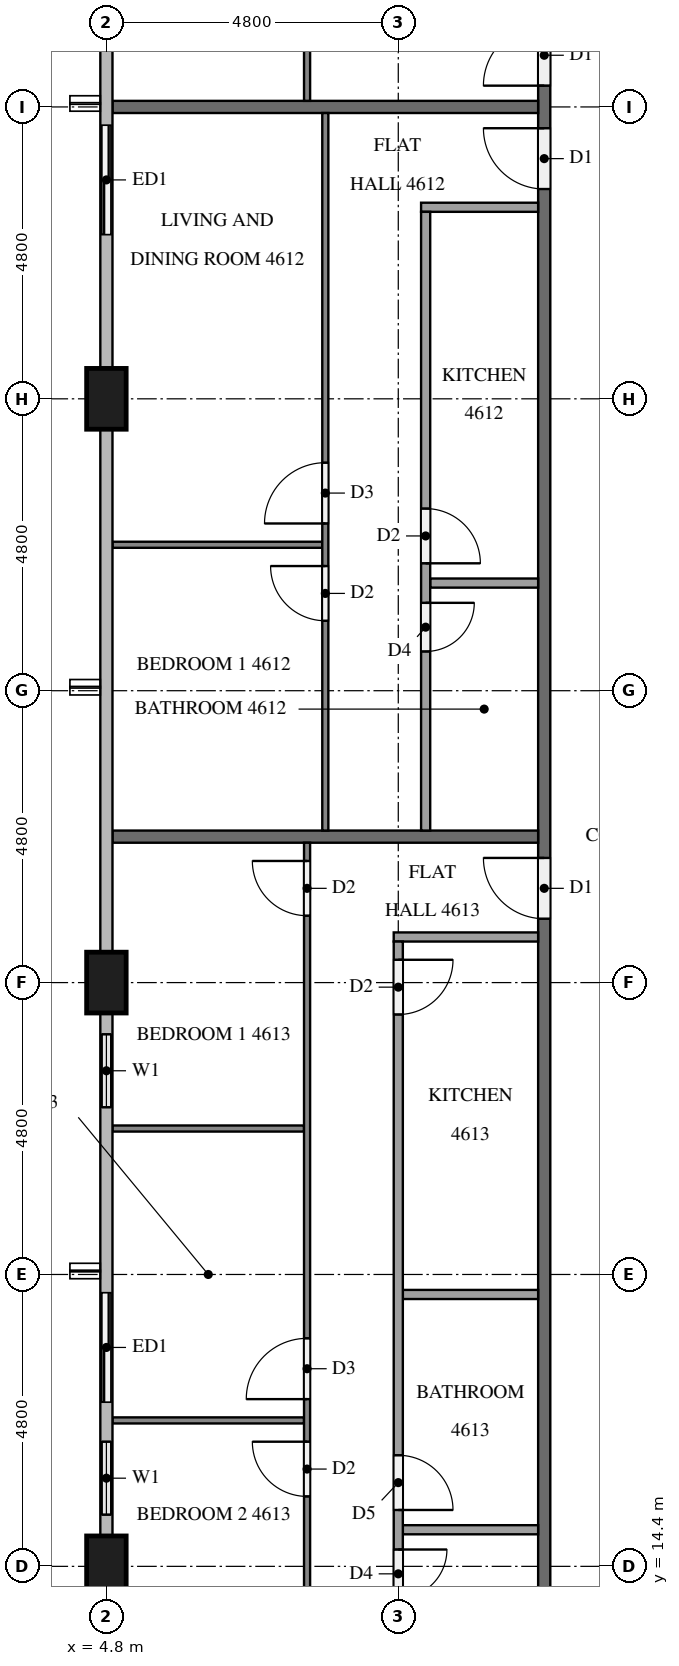
"""IFC4 building model, lengths in metres.
Left out: names, types, materials, properties, quantities, classifications, styles, units other than length and angle.
Written with IfcOpenShell. Run it as: python <this file> out.ifc"""

import sys

from ifc_helpers import new_model, si_unit, direction, frame, frame_2d, origin, origin_2d, place, context, subcontext, project, spatial, rectangle, extrude, element, fill, save


model = new_model("IFC4")
c1 = context("Model", 3, precision=1e-05, world=origin(), true_north=direction((0.0, 1.0)))
c2 = subcontext(c1, "Body", "Model", "MODEL_VIEW")
j1 = project(units=[si_unit("LENGTHUNIT", "METRE"), si_unit("PLANEANGLEUNIT", "RADIAN")], contexts=[c1])
p1 = place(None, origin())
s1 = spatial("IfcSite", under=j1, at=p1, CompositionType="ELEMENT")
p2 = place(p1, origin())
s2 = spatial("IfcBuilding", under=s1, at=p2, CompositionType="ELEMENT")
p3 = place(p2, frame((0.0, 0.0, 178.9)))
s3 = spatial("IfcBuildingStorey", under=s2, at=p3, CompositionType="ELEMENT", Elevation=178.9)
for number, where, z_axis, x_axis in (
    (1, (4.8, 33.6, 0.0), (0.0, 0.0, 1.0), (0.0, 1.0, 0.0)),
    (2, (4.8, 24.0, 0.0), (0.0, 0.0, 1.0), (0.0, 1.0, 0.0)),
    (3, (4.8, 14.4, 0.0), (0.0, 0.0, 1.0), (0.0, 1.0, 0.0)),
):
    element("IfcColumn", number, at=place(p3, frame(where, z_axis=z_axis, x_axis=x_axis)), inside=s3, PredefinedType="COLUMN", context=c2, shape_type="SweptSolid", body=[
        extrude(rectangle(XDim=1.0, YDim=0.65, at=origin_2d()), origin(), (0.0, 0.0, 1.0), 3.2),
    ])
p4 = place(p3, frame((4.8, 38.4, 0.0), z_axis=(0.0, 0.0, 1.0), x_axis=(0.0, -1.0, 0.0)))
e4 = element("IfcWall", 4, at=p4, inside=s3, PredefinedType="SOLIDWALL", context=c2, shape_type="SweptSolid", body=[
    extrude(rectangle(XDim=2.4, YDim=0.15, at=frame_2d((1.2, 0.0))), origin(), (0.0, 0.0, 1.0), 3.2),
])
p5 = place(p4, frame((0.3, 0.0, 0.0)))
e5 = element("IfcOpeningElement", 5, at=p5, cuts=e4, PredefinedType="OPENING", context=c2, shape_type="SweptSolid", body=[
    extrude(rectangle(XDim=1.8, YDim=2.4, at=frame_2d((0.9, 1.2))), frame((0.0, 0.085, 0.0), z_axis=(0.0, -1.0, 0.0), x_axis=(1.0, 0.0, 0.0)), (0.0, 0.0, 1.0), 0.17),
])
p6 = place(p3, frame((4.8, 23.5, 0.0), z_axis=(0.0, 0.0, 1.0), x_axis=(0.0, -1.0, 0.0)))
e6 = element("IfcWall", 6, at=p6, inside=s3, PredefinedType="SOLIDWALL", context=c2, shape_type="SweptSolid", body=[
    extrude(rectangle(XDim=1.9, YDim=0.15, at=frame_2d((0.95, 0.0))), origin(), (0.0, 0.0, 1.0), 3.2),
])
p7 = place(p6, frame((0.35, 0.0, 0.9)))
e7 = element("IfcOpeningElement", 7, at=p7, cuts=e6, PredefinedType="OPENING", context=c2, shape_type="SweptSolid", body=[
    extrude(rectangle(XDim=1.2, YDim=1.4, at=frame_2d((0.6, 0.7))), frame((0.0, 0.085, 0.0), z_axis=(0.0, -1.0, 0.0), x_axis=(1.0, 0.0, 0.0)), (0.0, 0.0, 1.0), 0.17),
])
p8 = place(p3, frame((4.8, 19.2, 0.0), z_axis=(0.0, 0.0, 1.0), x_axis=(0.0, -1.0, 0.0)))
e8 = element("IfcWall", 8, at=p8, inside=s3, PredefinedType="SOLIDWALL", context=c2, shape_type="SweptSolid", body=[
    extrude(rectangle(XDim=4.3, YDim=0.15, at=frame_2d((2.15, 0.0))), origin(), (0.0, 0.0, 1.0), 3.2),
])
p9 = place(p8, frame((0.3, 0.0, 0.0)))
e9 = element("IfcOpeningElement", 9, at=p9, cuts=e8, PredefinedType="OPENING", context=c2, shape_type="SweptSolid", body=[
    extrude(rectangle(XDim=1.8, YDim=2.4, at=frame_2d((0.9, 1.2))), frame((0.0, 0.085, 0.0), z_axis=(0.0, -1.0, 0.0), x_axis=(1.0, 0.0, 0.0)), (0.0, 0.0, 1.0), 0.17),
])
p10 = place(p8, frame((2.75, 0.0, 0.9)))
e10 = element("IfcOpeningElement", 10, at=p10, cuts=e8, PredefinedType="OPENING", context=c2, shape_type="SweptSolid", body=[
    extrude(rectangle(XDim=1.2, YDim=1.4, at=frame_2d((0.6, 0.7))), frame((0.0, 0.085, 0.0), z_axis=(0.0, -1.0, 0.0), x_axis=(1.0, 0.0, 0.0)), (0.0, 0.0, 1.0), 0.17),
])
p11 = place(p3, frame((12.0, 12.1, 0.0), z_axis=(0.0, 0.0, 1.0), x_axis=(0.0, 1.0, 0.0)))
e11 = element("IfcWall", 11, at=p11, inside=s3, PredefinedType="PARTITIONING", context=c2, shape_type="SweptSolid", body=[
    extrude(rectangle(XDim=28.6, YDim=0.2, at=frame_2d((14.3, 0.0))), origin(), (0.0, 0.0, 1.0), 3.2),
])
p12 = place(p11, frame((26.65, 0.0, 0.0)))
e12 = element("IfcOpeningElement", 12, at=p12, cuts=e11, PredefinedType="OPENING", context=c2, shape_type="SweptSolid", body=[
    extrude(rectangle(XDim=1.0, YDim=2.1, at=frame_2d((0.5, 1.05))), frame((0.0, 0.11, 0.0), z_axis=(0.0, -1.0, 0.0), x_axis=(1.0, 0.0, 0.0)), (0.0, 0.0, 1.0), 0.22),
])
p13 = place(p11, frame((24.95, 0.0, 0.0)))
e13 = element("IfcOpeningElement", 13, at=p13, cuts=e11, PredefinedType="OPENING", context=c2, shape_type="SweptSolid", body=[
    extrude(rectangle(XDim=1.0, YDim=2.1, at=frame_2d((0.5, 1.05))), frame((0.0, 0.11, 0.0), z_axis=(0.0, -1.0, 0.0), x_axis=(1.0, 0.0, 0.0)), (0.0, 0.0, 1.0), 0.22),
])
p14 = place(p11, frame((12.95, 0.0, 0.0)))
e14 = element("IfcOpeningElement", 14, at=p14, cuts=e11, PredefinedType="OPENING", context=c2, shape_type="SweptSolid", body=[
    extrude(rectangle(XDim=1.0, YDim=2.1, at=frame_2d((0.5, 1.05))), frame((0.0, 0.11, 0.0), z_axis=(0.0, -1.0, 0.0), x_axis=(1.0, 0.0, 0.0)), (0.0, 0.0, 1.0), 0.22),
])
for number, where, z_axis, x_axis in (
    (15, (4.9, 38.4, 0.0), (0.0, 0.0, 1.0), (1.0, 0.0, 0.0)),
    (16, (4.9, 26.4, 0.0), (0.0, 0.0, 1.0), (1.0, 0.0, 0.0)),
):
    element("IfcWall", number, at=place(p3, frame(where, z_axis=z_axis, x_axis=x_axis)), inside=s3, PredefinedType="PARTITIONING", context=c2, shape_type="SweptSolid", body=[
        extrude(rectangle(XDim=7.0, YDim=0.2, at=frame_2d((3.5, 0.0))), origin(), (0.0, 0.0, 1.0), 3.2),
    ])
p15 = place(p3, frame((8.1, 38.5, 0.0), z_axis=(0.0, 0.0, 1.0), x_axis=(0.0, 1.0, 0.0)))
e17 = element("IfcWall", 17, at=p15, inside=s3, PredefinedType="PARTITIONING", context=c2, shape_type="SweptSolid", body=[
    extrude(rectangle(XDim=8.998, YDim=0.1, at=frame_2d((4.499, 0.0))), origin(), (0.0, 0.0, 1.0), 3.2),
])
p16 = place(p15, frame((3.35, 0.0, 0.0)))
e18 = element("IfcOpeningElement", 18, at=p16, cuts=e17, PredefinedType="OPENING", context=c2, shape_type="SweptSolid", body=[
    extrude(rectangle(XDim=1.0, YDim=2.1, at=frame_2d((0.5, 1.05))), frame((0.0, 0.06, 0.0), z_axis=(0.0, -1.0, 0.0), x_axis=(1.0, 0.0, 0.0)), (0.0, 0.0, 1.0), 0.12),
])
p17 = place(p15, frame((5.05, 0.0, 0.0)))
e19 = element("IfcOpeningElement", 19, at=p17, cuts=e17, PredefinedType="OPENING", context=c2, shape_type="SweptSolid", body=[
    extrude(rectangle(XDim=0.9, YDim=2.1, at=frame_2d((0.45, 1.05))), frame((0.0, 0.06, 0.0), z_axis=(0.0, -1.0, 0.0), x_axis=(1.0, 0.0, 0.0)), (0.0, 0.0, 1.0), 0.12),
])
p18 = place(p3, frame((8.35, 31.2, 0.0), z_axis=(0.0, 0.0, 1.0), x_axis=(-1.0, 0.0, 0.0)))
e20 = element("IfcWall", 20, at=p18, inside=s3, PredefinedType="PARTITIONING", context=c2, shape_type="SweptSolid", body=[
    extrude(rectangle(XDim=3.45, YDim=0.1, at=frame_2d((1.725, 0.0))), origin(), (0.0, 0.0, 1.0), 3.2),
])
p19 = place(p3, frame((8.4, 26.5, 0.0), z_axis=(0.0, 0.0, 1.0), x_axis=(0.0, 1.0, 0.0)))
e21 = element("IfcWall", 21, at=p19, inside=s3, PredefinedType="PARTITIONING", context=c2, shape_type="SweptSolid", body=[
    extrude(rectangle(XDim=11.8, YDim=0.1, at=frame_2d((5.9, 0.0))), origin(), (0.0, 0.0, 1.0), 3.2),
])
p20 = place(p19, frame((5.05, 0.0, 0.0)))
e22 = element("IfcOpeningElement", 22, at=p20, cuts=e21, PredefinedType="OPENING", context=c2, shape_type="SweptSolid", body=[
    extrude(rectangle(XDim=1.0, YDim=2.1, at=frame_2d((0.5, 1.05))), frame((0.0, 0.06, 0.0), z_axis=(0.0, -1.0, 0.0), x_axis=(1.0, 0.0, 0.0)), (0.0, 0.0, 1.0), 0.12),
])
p21 = place(p19, frame((3.45, 0.0, 0.0)))
e23 = element("IfcOpeningElement", 23, at=p21, cuts=e21, PredefinedType="OPENING", context=c2, shape_type="SweptSolid", body=[
    extrude(rectangle(XDim=0.9, YDim=2.1, at=frame_2d((0.45, 1.05))), frame((0.0, 0.06, 0.0), z_axis=(0.0, -1.0, 0.0), x_axis=(1.0, 0.0, 0.0)), (0.0, 0.0, 1.0), 0.12),
])
p22 = place(p3, frame((11.9, 30.57, 0.0), z_axis=(0.0, 0.0, 1.0), x_axis=(-1.0, 0.0, 0.0)))
e24 = element("IfcWall", 24, at=p22, inside=s3, PredefinedType="PARTITIONING", context=c2, shape_type="SweptSolid", body=[
    extrude(rectangle(XDim=1.775, YDim=0.15, at=frame_2d((0.887, 0.0))), origin(), (0.0, 0.0, 1.0), 3.2),
])
p23 = place(p3, frame((11.9, 36.75, 0.0), z_axis=(0.0, 0.0, 1.0), x_axis=(-1.0, 0.0, 0.0)))
e25 = element("IfcWall", 25, at=p23, inside=s3, PredefinedType="PARTITIONING", context=c2, shape_type="SweptSolid", body=[
    extrude(rectangle(XDim=1.925, YDim=0.15, at=frame_2d((0.962, 0.0))), origin(), (0.0, 0.0, 1.0), 3.2),
])
p24 = place(p3, frame((10.05, 36.675, 0.0), z_axis=(0.0, 0.0, 1.0), x_axis=(0.0, -1.0, 0.0)))
e26 = element("IfcWall", 26, at=p24, inside=s3, PredefinedType="PARTITIONING", context=c2, shape_type="SweptSolid", body=[
    extrude(rectangle(XDim=10.175, YDim=0.15, at=frame_2d((5.087, 0.0))), origin(), (0.0, 0.0, 1.0), 3.2),
])
p25 = place(p24, frame((4.88, 0.0, 0.0)))
e27 = element("IfcOpeningElement", 27, at=p25, cuts=e26, PredefinedType="OPENING", context=c2, shape_type="SweptSolid", body=[
    extrude(rectangle(XDim=0.9, YDim=2.1, at=frame_2d((0.45, 1.05))), frame((0.0, 0.085, 0.0), z_axis=(0.0, -1.0, 0.0), x_axis=(1.0, 0.0, 0.0)), (0.0, 0.0, 1.0), 0.17),
])
p26 = place(p24, frame((6.43, 0.0, 0.0)))
e28 = element("IfcOpeningElement", 28, at=p26, cuts=e26, PredefinedType="OPENING", context=c2, shape_type="SweptSolid", body=[
    extrude(rectangle(XDim=0.8, YDim=2.1, at=frame_2d((0.4, 1.05))), frame((0.0, 0.085, 0.0), z_axis=(0.0, -1.0, 0.0), x_axis=(1.0, 0.0, 0.0)), (0.0, 0.0, 1.0), 0.17),
])
for number, where, z_axis, x_axis in (
    (29, (8.05, 21.6, 0.0), (0.0, 0.0, 1.0), (-1.0, 0.0, 0.0)),
    (30, (8.05, 16.8, 0.0), (0.0, 0.0, 1.0), (-1.0, 0.0, 0.0)),
):
    element("IfcWall", number, at=place(p3, frame(where, z_axis=z_axis, x_axis=x_axis)), inside=s3, PredefinedType="PARTITIONING", context=c2, shape_type="SweptSolid", body=[
        extrude(rectangle(XDim=3.15, YDim=0.1, at=frame_2d((1.575, 0.0))), origin(), (0.0, 0.0, 1.0), 3.2),
    ])
p27 = place(p3, frame((8.1, 12.1, 0.0), z_axis=(0.0, 0.0, 1.0), x_axis=(0.0, 1.0, 0.0)))
e31 = element("IfcWall", 31, at=p27, inside=s3, PredefinedType="PARTITIONING", context=c2, shape_type="SweptSolid", body=[
    extrude(rectangle(XDim=14.2, YDim=0.1, at=frame_2d((7.1, 0.0))), origin(), (0.0, 0.0, 1.0), 3.2),
])
p28 = place(p27, frame((13.0, 0.0, 0.0)))
e32 = element("IfcOpeningElement", 32, at=p28, cuts=e31, PredefinedType="OPENING", context=c2, shape_type="SweptSolid", body=[
    extrude(rectangle(XDim=0.9, YDim=2.1, at=frame_2d((0.45, 1.05))), frame((0.0, 0.06, 0.0), z_axis=(0.0, -1.0, 0.0), x_axis=(1.0, 0.0, 0.0)), (0.0, 0.0, 1.0), 0.12),
])
p29 = place(p27, frame((5.05, 0.0, 0.0)))
e33 = element("IfcOpeningElement", 33, at=p29, cuts=e31, PredefinedType="OPENING", context=c2, shape_type="SweptSolid", body=[
    extrude(rectangle(XDim=1.0, YDim=2.1, at=frame_2d((0.5, 1.05))), frame((0.0, 0.06, 0.0), z_axis=(0.0, -1.0, 0.0), x_axis=(1.0, 0.0, 0.0)), (0.0, 0.0, 1.0), 0.12),
])
p30 = place(p27, frame((3.45, 0.0, 0.0)))
e34 = element("IfcOpeningElement", 34, at=p30, cuts=e31, PredefinedType="OPENING", context=c2, shape_type="SweptSolid", body=[
    extrude(rectangle(XDim=0.9, YDim=2.1, at=frame_2d((0.45, 1.05))), frame((0.0, 0.06, 0.0), z_axis=(0.0, -1.0, 0.0), x_axis=(1.0, 0.0, 0.0)), (0.0, 0.0, 1.0), 0.12),
])
for number, where, z_axis, x_axis in (
    (35, (11.9, 18.871, 0.0), (0.0, 0.0, 1.0), (-1.0, 0.0, 0.0)),
    (36, (11.9, 15.002, 0.0), (0.0, 0.0, 1.0), (-1.0, 0.0, 0.0)),
):
    element("IfcWall", number, at=place(p3, frame(where, z_axis=z_axis, x_axis=x_axis)), inside=s3, PredefinedType="PARTITIONING", context=c2, shape_type="SweptSolid", body=[
        extrude(rectangle(XDim=2.225, YDim=0.15, at=frame_2d((1.112, 0.0))), origin(), (0.0, 0.0, 1.0), 3.2),
    ])
p31 = place(p3, frame((11.9, 24.75, 0.0), z_axis=(0.0, 0.0, 1.0), x_axis=(-1.0, 0.0, 0.0)))
e37 = element("IfcWall", 37, at=p31, inside=s3, PredefinedType="PARTITIONING", context=c2, shape_type="SweptSolid", body=[
    extrude(rectangle(XDim=2.375, YDim=0.15, at=frame_2d((1.188, 0.0))), origin(), (0.0, 0.0, 1.0), 3.2),
])
p32 = place(p3, frame((9.6, 24.675, 0.0), z_axis=(0.0, 0.0, 1.0), x_axis=(0.0, -1.0, 0.0)))
e38 = element("IfcWall", 38, at=p32, inside=s3, PredefinedType="PARTITIONING", context=c2, shape_type="SweptSolid", body=[
    extrude(rectangle(XDim=12.575, YDim=0.15, at=frame_2d((6.288, 0.0))), origin(), (0.0, 0.0, 1.0), 3.2),
])
p33 = place(p32, frame((0.3, 0.0, 0.0)))
e39 = element("IfcOpeningElement", 39, at=p33, cuts=e38, PredefinedType="OPENING", context=c2, shape_type="SweptSolid", body=[
    extrude(rectangle(XDim=0.9, YDim=2.1, at=frame_2d((0.45, 1.05))), frame((0.0, 0.085, 0.0), z_axis=(0.0, -1.0, 0.0), x_axis=(1.0, 0.0, 0.0)), (0.0, 0.0, 1.0), 0.17),
])
p34 = place(p32, frame((8.448, 0.0, 0.0)))
e40 = element("IfcOpeningElement", 40, at=p34, cuts=e38, PredefinedType="OPENING", context=c2, shape_type="SweptSolid", body=[
    extrude(rectangle(XDim=0.9, YDim=2.1, at=frame_2d((0.45, 1.05))), frame((0.0, 0.085, 0.0), z_axis=(0.0, -1.0, 0.0), x_axis=(1.0, 0.0, 0.0)), (0.0, 0.0, 1.0), 0.17),
])
p35 = place(p32, frame((9.998, 0.0, 0.0)))
e41 = element("IfcOpeningElement", 41, at=p35, cuts=e38, PredefinedType="OPENING", context=c2, shape_type="SweptSolid", body=[
    extrude(rectangle(XDim=0.8, YDim=2.1, at=frame_2d((0.4, 1.05))), frame((0.0, 0.085, 0.0), z_axis=(0.0, -1.0, 0.0), x_axis=(1.0, 0.0, 0.0)), (0.0, 0.0, 1.0), 0.17),
])
p36 = place(p5, origin())
e42 = element("IfcDoor", 42, at=p36, inside=s3, OperationType="SLIDING_TO_RIGHT", PredefinedType="DOOR", context=c2, shape_type="SweptSolid", body=[
    extrude(rectangle(XDim=1.8, YDim=2.4, at=frame_2d((0.9, 1.2))), frame((0.0, 0.025, 0.0), z_axis=(0.0, -1.0, 0.0), x_axis=(1.0, 0.0, 0.0)), (0.0, 0.0, 1.0), 0.05),
])
fill(e5, e42)
p37 = place(p7, origin())
e43 = element("IfcWindow", 43, at=p37, inside=s3, PartitioningType="SINGLE_PANEL", PredefinedType="WINDOW", context=c2, shape_type="SweptSolid", body=[
    extrude(rectangle(XDim=1.2, YDim=1.4, at=frame_2d((0.6, 0.7))), frame((0.0, 0.03, 0.0), z_axis=(0.0, -1.0, 0.0), x_axis=(1.0, 0.0, 0.0)), (0.0, 0.0, 1.0), 0.06),
])
fill(e7, e43)
p38 = place(p9, origin())
e44 = element("IfcDoor", 44, at=p38, inside=s3, OperationType="SLIDING_TO_LEFT", PredefinedType="DOOR", context=c2, shape_type="SweptSolid", body=[
    extrude(rectangle(XDim=1.8, YDim=2.4, at=frame_2d((0.9, 1.2))), frame((0.0, 0.025, 0.0), z_axis=(0.0, -1.0, 0.0), x_axis=(1.0, 0.0, 0.0)), (0.0, 0.0, 1.0), 0.05),
])
fill(e9, e44)
p39 = place(p10, origin())
e45 = element("IfcWindow", 45, at=p39, inside=s3, PartitioningType="SINGLE_PANEL", PredefinedType="WINDOW", context=c2, shape_type="SweptSolid", body=[
    extrude(rectangle(XDim=1.2, YDim=1.4, at=frame_2d((0.6, 0.7))), frame((0.0, 0.03, 0.0), z_axis=(0.0, -1.0, 0.0), x_axis=(1.0, 0.0, 0.0)), (0.0, 0.0, 1.0), 0.06),
])
fill(e10, e45)
p40 = place(p12, origin())
e46 = element("IfcDoor", 46, at=p40, inside=s3, OperationType="SINGLE_SWING_LEFT", PredefinedType="DOOR", context=c2, shape_type="SweptSolid", body=[
    extrude(rectangle(XDim=1.0, YDim=2.1, at=frame_2d((0.5, 1.05))), frame((0.0, 0.025, 0.0), z_axis=(0.0, -1.0, 0.0), x_axis=(1.0, 0.0, 0.0)), (0.0, 0.0, 1.0), 0.05),
])
fill(e12, e46)
p41 = place(p13, origin())
e47 = element("IfcDoor", 47, at=p41, inside=s3, OperationType="SINGLE_SWING_RIGHT", PredefinedType="DOOR", context=c2, shape_type="SweptSolid", body=[
    extrude(rectangle(XDim=1.0, YDim=2.1, at=frame_2d((0.5, 1.05))), frame((0.0, 0.025, 0.0), z_axis=(0.0, -1.0, 0.0), x_axis=(1.0, 0.0, 0.0)), (0.0, 0.0, 1.0), 0.05),
])
fill(e13, e47)
p42 = place(p14, origin())
e48 = element("IfcDoor", 48, at=p42, inside=s3, OperationType="SINGLE_SWING_RIGHT", PredefinedType="DOOR", context=c2, shape_type="SweptSolid", body=[
    extrude(rectangle(XDim=1.0, YDim=2.1, at=frame_2d((0.5, 1.05))), frame((0.0, 0.025, 0.0), z_axis=(0.0, -1.0, 0.0), x_axis=(1.0, 0.0, 0.0)), (0.0, 0.0, 1.0), 0.05),
])
fill(e14, e48)
p43 = place(p20, origin())
e49 = element("IfcDoor", 49, at=p43, inside=s3, OperationType="SINGLE_SWING_LEFT", PredefinedType="DOOR", context=c2, shape_type="SweptSolid", body=[
    extrude(rectangle(XDim=1.0, YDim=2.1, at=frame_2d((0.5, 1.05))), frame((0.0, 0.025, 0.0), z_axis=(0.0, -1.0, 0.0), x_axis=(1.0, 0.0, 0.0)), (0.0, 0.0, 1.0), 0.05),
])
fill(e22, e49)
p44 = place(p21, origin())
e50 = element("IfcDoor", 50, at=p44, inside=s3, OperationType="SINGLE_SWING_RIGHT", PredefinedType="DOOR", context=c2, shape_type="SweptSolid", body=[
    extrude(rectangle(XDim=0.9, YDim=2.1, at=frame_2d((0.45, 1.05))), frame((0.0, 0.025, 0.0), z_axis=(0.0, -1.0, 0.0), x_axis=(1.0, 0.0, 0.0)), (0.0, 0.0, 1.0), 0.05),
])
fill(e23, e50)
p45 = place(p25, origin())
e51 = element("IfcDoor", 51, at=p45, inside=s3, OperationType="SINGLE_SWING_RIGHT", PredefinedType="DOOR", context=c2, shape_type="SweptSolid", body=[
    extrude(rectangle(XDim=0.9, YDim=2.1, at=frame_2d((0.45, 1.05))), frame((0.0, 0.025, 0.0), z_axis=(0.0, -1.0, 0.0), x_axis=(1.0, 0.0, 0.0)), (0.0, 0.0, 1.0), 0.05),
])
fill(e27, e51)
p46 = place(p26, origin())
e52 = element("IfcDoor", 52, at=p46, inside=s3, OperationType="SINGLE_SWING_LEFT", PredefinedType="DOOR", context=c2, shape_type="SweptSolid", body=[
    extrude(rectangle(XDim=0.8, YDim=2.1, at=frame_2d((0.4, 1.05))), frame((0.0, 0.025, 0.0), z_axis=(0.0, -1.0, 0.0), x_axis=(1.0, 0.0, 0.0)), (0.0, 0.0, 1.0), 0.05),
])
fill(e28, e52)
p47 = place(p28, origin())
e53 = element("IfcDoor", 53, at=p47, inside=s3, OperationType="SINGLE_SWING_RIGHT", PredefinedType="DOOR", context=c2, shape_type="SweptSolid", body=[
    extrude(rectangle(XDim=0.9, YDim=2.1, at=frame_2d((0.45, 1.05))), frame((0.0, 0.025, 0.0), z_axis=(0.0, -1.0, 0.0), x_axis=(1.0, 0.0, 0.0)), (0.0, 0.0, 1.0), 0.05),
])
fill(e32, e53)
p48 = place(p29, origin())
e54 = element("IfcDoor", 54, at=p48, inside=s3, OperationType="SINGLE_SWING_LEFT", PredefinedType="DOOR", context=c2, shape_type="SweptSolid", body=[
    extrude(rectangle(XDim=1.0, YDim=2.1, at=frame_2d((0.5, 1.05))), frame((0.0, 0.025, 0.0), z_axis=(0.0, -1.0, 0.0), x_axis=(1.0, 0.0, 0.0)), (0.0, 0.0, 1.0), 0.05),
])
fill(e33, e54)
p49 = place(p30, origin())
e55 = element("IfcDoor", 55, at=p49, inside=s3, OperationType="SINGLE_SWING_RIGHT", PredefinedType="DOOR", context=c2, shape_type="SweptSolid", body=[
    extrude(rectangle(XDim=0.9, YDim=2.1, at=frame_2d((0.45, 1.05))), frame((0.0, 0.025, 0.0), z_axis=(0.0, -1.0, 0.0), x_axis=(1.0, 0.0, 0.0)), (0.0, 0.0, 1.0), 0.05),
])
fill(e34, e55)
p50 = place(p33, origin())
e56 = element("IfcDoor", 56, at=p50, inside=s3, OperationType="SINGLE_SWING_LEFT", PredefinedType="DOOR", context=c2, shape_type="SweptSolid", body=[
    extrude(rectangle(XDim=0.9, YDim=2.1, at=frame_2d((0.45, 1.05))), frame((0.0, 0.025, 0.0), z_axis=(0.0, -1.0, 0.0), x_axis=(1.0, 0.0, 0.0)), (0.0, 0.0, 1.0), 0.05),
])
fill(e39, e56)
p51 = place(p34, origin())
e57 = element("IfcDoor", 57, at=p51, inside=s3, OperationType="SINGLE_SWING_RIGHT", PredefinedType="DOOR", context=c2, shape_type="SweptSolid", body=[
    extrude(rectangle(XDim=0.9, YDim=2.1, at=frame_2d((0.45, 1.05))), frame((0.0, 0.025, 0.0), z_axis=(0.0, -1.0, 0.0), x_axis=(1.0, 0.0, 0.0)), (0.0, 0.0, 1.0), 0.05),
])
fill(e40, e57)
p52 = place(p35, origin())
e58 = element("IfcDoor", 58, at=p52, inside=s3, OperationType="SINGLE_SWING_LEFT", PredefinedType="DOOR", context=c2, shape_type="SweptSolid", body=[
    extrude(rectangle(XDim=0.8, YDim=2.1, at=frame_2d((0.4, 1.05))), frame((0.0, 0.025, 0.0), z_axis=(0.0, -1.0, 0.0), x_axis=(1.0, 0.0, 0.0)), (0.0, 0.0, 1.0), 0.05),
])
fill(e41, e58)
save(model, sys.argv[1])
